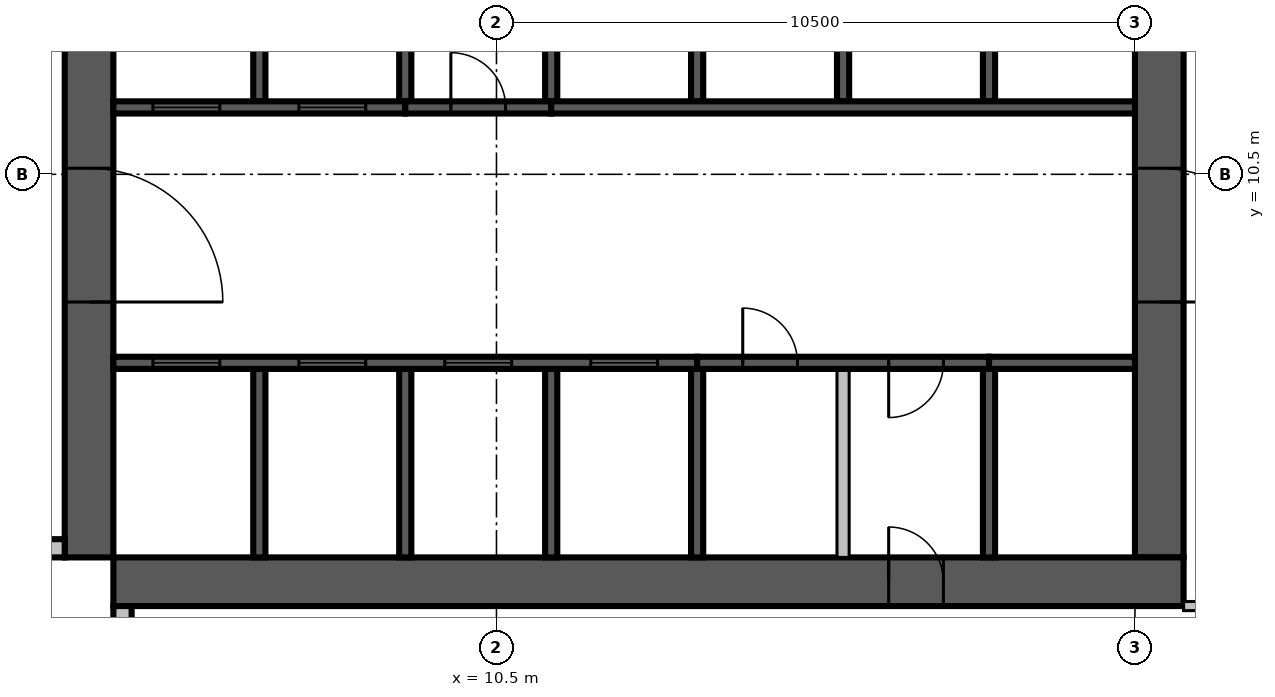
"""IFC4 building model, lengths in metres.
Left out: names, types, materials, properties, quantities, classifications, styles, units other than length and angle.
Written with IfcOpenShell. Run it as: python <this file> out.ifc"""

import sys

from ifc_helpers import new_model, si_unit, direction, frame, frame_2d, origin, place, context, subcontext, project, spatial, rectangle, extrude, source, transform, mapped, element, fill, save


model = new_model("IFC4")
c1 = context("Model", 3, precision=1e-05, world=origin(), true_north=direction((0.0, 1.0)))
c2 = subcontext(c1, "Body", "Model", "MODEL_VIEW")
j1 = project(units=[si_unit("LENGTHUNIT", "METRE"), si_unit("PLANEANGLEUNIT", "RADIAN")], contexts=[c1])
p1 = place(None, origin())
s1 = spatial("IfcSite", under=j1, at=p1, CompositionType="ELEMENT")
p2 = place(p1, origin())
s2 = spatial("IfcBuilding", under=s1, at=p2, CompositionType="ELEMENT")
p3 = place(p2, frame((0.0, 0.0, 242.4)))
s3 = spatial("IfcBuildingStorey", under=s2, at=p3, CompositionType="ELEMENT", Elevation=242.4)
m1 = source(origin(), c2, "Body", "SweptSolid", [
    extrude(rectangle(XDim=17.6, YDim=0.8, at=frame_2d((8.8, 0.0))), origin(), (0.0, 0.0, 1.0), 3.8),
])
p4 = place(p3, frame((3.8, 4.2, 0.0), z_axis=(0.0, 0.0, 1.0), x_axis=(0.0, 1.0, 0.0)))
e1 = element("IfcWall", 1, at=p4, inside=s3, PredefinedType="SHEAR", context=c2, shape_type="MappedRepresentation", body=[
    mapped(m1, transform((0.0, 0.0, 0.0), scale=1.0)),
])
m2 = source(origin(), c2, "Body", "SweptSolid", [
    extrude(rectangle(XDim=2.2, YDim=2.1, at=frame_2d((1.1, 1.05))), frame((0.0, 0.41, 0.0), z_axis=(0.0, -1.0, 0.0), x_axis=(1.0, 0.0, 0.0)), (0.0, 0.0, 1.0), 0.82),
])
p5 = place(p4, frame((4.2, 0.0, 0.0)))
e2 = element("IfcOpeningElement", 2, at=p5, cuts=e1, PredefinedType="OPENING", context=c2, shape_type="MappedRepresentation", body=[
    mapped(m2, transform((0.0, 0.0, 0.0), scale=1.0)),
])
m3 = source(origin(), c2, "Body", "SweptSolid", [
    extrude(rectangle(XDim=0.9, YDim=2.1, at=frame_2d((0.45, 1.05))), frame((0.0, 0.41, 0.0), z_axis=(0.0, -1.0, 0.0), x_axis=(1.0, 0.0, 0.0)), (0.0, 0.0, 1.0), 0.82),
])
p6 = place(p4, frame((10.95, 0.0, 0.0)))
e3 = element("IfcOpeningElement", 3, at=p6, cuts=e1, PredefinedType="OPENING", context=c2, shape_type="MappedRepresentation", body=[
    mapped(m3, transform((0.0, 0.0, 0.0), scale=1.0)),
])
m4 = source(origin(), c2, "Body", "SweptSolid", [
    extrude(rectangle(XDim=16.8, YDim=0.8, at=frame_2d((8.4, 0.0))), origin(), (0.0, 0.0, 1.0), 3.8),
])
p7 = place(p3, frame((21.4, 4.2, 0.0), z_axis=(0.0, 0.0, 1.0), x_axis=(0.0, 1.0, 0.0)))
e4 = element("IfcWall", 4, at=p7, inside=s3, PredefinedType="SHEAR", context=c2, shape_type="MappedRepresentation", body=[
    mapped(m4, transform((0.0, 0.0, 0.0), scale=1.0)),
])
p8 = place(p7, frame((4.2, 0.0, 0.0)))
e5 = element("IfcOpeningElement", 5, at=p8, cuts=e4, PredefinedType="OPENING", context=c2, shape_type="MappedRepresentation", body=[
    mapped(m2, transform((0.0, 0.0, 0.0), scale=1.0)),
])
m5 = source(origin(), c2, "Body", "SweptSolid", [
    extrude(rectangle(XDim=1.2, YDim=2.1, at=frame_2d((0.6, 1.05))), frame((0.0, 0.41, 0.0), z_axis=(0.0, -1.0, 0.0), x_axis=(1.0, 0.0, 0.0)), (0.0, 0.0, 1.0), 0.82),
])
p9 = place(p7, frame((14.7, 0.0, 0.0)))
e6 = element("IfcOpeningElement", 6, at=p9, cuts=e4, PredefinedType="OPENING", context=c2, shape_type="MappedRepresentation", body=[
    mapped(m5, transform((0.0, 0.0, 0.0), scale=1.0)),
])
p10 = place(p3, frame((4.2, 3.8, 0.0), z_axis=(0.0, 0.0, 1.0), x_axis=(1.0, 0.0, 0.0)))
e7 = element("IfcWall", 7, at=p10, inside=s3, PredefinedType="SHEAR", context=c2, shape_type="MappedRepresentation", body=[
    mapped(m1, transform((0.0, 0.0, 0.0), scale=1.0)),
])
p11 = place(p10, frame((12.75, 0.0, 0.0)))
e8 = element("IfcOpeningElement", 8, at=p11, cuts=e7, PredefinedType="OPENING", context=c2, shape_type="MappedRepresentation", body=[
    mapped(m3, transform((0.0, 0.0, 0.0), scale=1.0)),
])
m6 = source(origin(), c2, "Body", "SweptSolid", [
    extrude(rectangle(XDim=3.4, YDim=0.3, at=frame_2d((1.7, 0.0))), origin(), (0.0, 0.0, 1.0), 3.4),
])
p12 = place(p3, frame((0.0, 4.35, 0.0), z_axis=(0.0, 0.0, 1.0), x_axis=(1.0, 0.0, 0.0)))
e9 = element("IfcWall", 9, at=p12, inside=s3, PredefinedType="STANDARD", context=c2, shape_type="MappedRepresentation", body=[
    mapped(m6, transform((0.0, 0.0, 0.0), scale=1.0)),
])
m7 = source(origin(), c2, "Body", "SweptSolid", [
    extrude(rectangle(XDim=1.8, YDim=2.3, at=frame_2d((0.9, 1.15))), frame((0.0, 0.16, 0.0), z_axis=(0.0, -1.0, 0.0), x_axis=(1.0, 0.0, 0.0)), (0.0, 0.0, 1.0), 0.32),
])
p13 = place(p12, frame((1.2, 0.0, 0.6)))
e10 = element("IfcOpeningElement", 10, at=p13, cuts=e9, PredefinedType="OPENING", context=c2, shape_type="MappedRepresentation", body=[
    mapped(m7, transform((0.0, 0.0, 0.0), scale=1.0)),
])
p14 = place(p3, frame((4.35, 3.4, 0.0), z_axis=(0.0, 0.0, 1.0), x_axis=(0.0, -1.0, 0.0)))
e11 = element("IfcWall", 11, at=p14, inside=s3, PredefinedType="STANDARD", context=c2, shape_type="MappedRepresentation", body=[
    mapped(m6, transform((0.0, 0.0, 0.0), scale=1.0)),
])
p15 = place(p14, frame((0.4, 0.0, 0.6)))
e12 = element("IfcOpeningElement", 12, at=p15, cuts=e11, PredefinedType="OPENING", context=c2, shape_type="MappedRepresentation", body=[
    mapped(m7, transform((0.0, 0.0, 0.0), scale=1.0)),
])
m8 = source(origin(), c2, "Body", "SweptSolid", [
    extrude(rectangle(XDim=3.1, YDim=0.2, at=frame_2d((1.55, 0.0))), origin(), (0.0, 0.0, 1.0), 3.8),
])
for number, where, z_axis, x_axis in (
    (13, (6.6, 4.2, 0.0), (0.0, 0.0, 1.0), (0.0, 1.0, 0.0)),
    (14, (9.0, 4.2, 0.0), (0.0, 0.0, 1.0), (0.0, 1.0, 0.0)),
    (15, (11.4, 4.2, 0.0), (0.0, 0.0, 1.0), (0.0, 1.0, 0.0)),
):
    element("IfcWall", number, at=place(p3, frame(where, z_axis=z_axis, x_axis=x_axis)), inside=s3, PredefinedType="SOLIDWALL", context=c2, shape_type="MappedRepresentation", body=[
        mapped(m8, transform((0.0, 0.0, 0.0), scale=1.0)),
    ])
m9 = source(origin(), c2, "Body", "SweptSolid", [
    extrude(rectangle(XDim=3.1, YDim=0.2, at=frame_2d((1.55, 0.0))), origin(), (0.0, 0.0, 1.0), 3.4),
])
for number, where, z_axis, x_axis in (
    (16, (13.8, 4.2, 0.0), (0.0, 0.0, 1.0), (0.0, 1.0, 0.0)),
    (17, (18.6, 4.2, 0.0), (0.0, 0.0, 1.0), (0.0, 1.0, 0.0)),
):
    element("IfcWall", number, at=place(p3, frame(where, z_axis=z_axis, x_axis=x_axis)), inside=s3, PredefinedType="SOLIDWALL", context=c2, shape_type="MappedRepresentation", body=[
        mapped(m9, transform((0.0, 0.0, 0.0), scale=1.0)),
    ])
m10 = source(origin(), c2, "Body", "SweptSolid", [
    extrude(rectangle(XDim=3.1, YDim=0.2, at=frame_2d((1.55, 0.0))), origin(), (0.0, 0.0, 1.0), 3.4),
])
p16 = place(p3, frame((16.2, 4.2, 0.0), z_axis=(0.0, 0.0, 1.0), x_axis=(0.0, 1.0, 0.0)))
e18 = element("IfcWall", 18, at=p16, inside=s3, PredefinedType="PARTITIONING", context=c2, shape_type="MappedRepresentation", body=[
    mapped(m10, transform((0.0, 0.0, 0.0), scale=1.0)),
])
m11 = source(origin(), c2, "Body", "SweptSolid", [
    extrude(rectangle(XDim=3.0, YDim=0.2, at=frame_2d((1.5, 0.0))), origin(), (0.0, 0.0, 1.0), 3.8),
])
p17 = place(p3, frame((6.6, 11.7, 0.0), z_axis=(0.0, 0.0, 1.0), x_axis=(0.0, 1.0, 0.0)))
e19 = element("IfcWall", 19, at=p17, inside=s3, PredefinedType="SOLIDWALL", context=c2, shape_type="MappedRepresentation", body=[
    mapped(m11, transform((0.0, 0.0, 0.0), scale=1.0)),
])
m12 = source(origin(), c2, "Body", "SweptSolid", [
    extrude(rectangle(XDim=3.0, YDim=0.2, at=frame_2d((1.5, 0.0))), origin(), (0.0, 0.0, 1.0), 3.4),
])
for number, where, z_axis, x_axis in (
    (20, (9.0, 11.7, 0.0), (0.0, 0.0, 1.0), (0.0, 1.0, 0.0)),
    (21, (11.4, 11.7, 0.0), (0.0, 0.0, 1.0), (0.0, 1.0, 0.0)),
):
    element("IfcWall", number, at=place(p3, frame(where, z_axis=z_axis, x_axis=x_axis)), inside=s3, PredefinedType="SOLIDWALL", context=c2, shape_type="MappedRepresentation", body=[
        mapped(m12, transform((0.0, 0.0, 0.0), scale=1.0)),
    ])
for number, where, z_axis, x_axis in (
    (22, (13.8, 11.7, 0.0), (0.0, 0.0, 1.0), (0.0, 1.0, 0.0)),
    (23, (16.2, 11.7, 0.0), (0.0, 0.0, 1.0), (0.0, 1.0, 0.0)),
    (24, (18.6, 11.7, 0.0), (0.0, 0.0, 1.0), (0.0, 1.0, 0.0)),
):
    element("IfcWall", number, at=place(p3, frame(where, z_axis=z_axis, x_axis=x_axis)), inside=s3, PredefinedType="SOLIDWALL", context=c2, shape_type="MappedRepresentation", body=[
        mapped(m11, transform((0.0, 0.0, 0.0), scale=1.0)),
    ])
m13 = source(origin(), c2, "Body", "SweptSolid", [
    extrude(rectangle(XDim=9.6, YDim=0.2, at=frame_2d((4.8, 0.0))), origin(), (0.0, 0.0, 1.0), 3.8),
])
p18 = place(p3, frame((4.2, 7.4, 0.0), z_axis=(0.0, 0.0, 1.0), x_axis=(1.0, 0.0, 0.0)))
e25 = element("IfcWall", 25, at=p18, inside=s3, PredefinedType="SOLIDWALL", context=c2, shape_type="MappedRepresentation", body=[
    mapped(m13, transform((0.0, 0.0, 0.0), scale=1.0)),
])
m14 = source(origin(), c2, "Body", "SweptSolid", [
    extrude(rectangle(XDim=1.1, YDim=2.1, at=frame_2d((0.55, 1.05))), frame((0.0, 0.11, 0.0), z_axis=(0.0, -1.0, 0.0), x_axis=(1.0, 0.0, 0.0)), (0.0, 0.0, 1.0), 0.22),
])
p19 = place(p18, frame((0.65, 0.0, 0.0)))
e26 = element("IfcOpeningElement", 26, at=p19, cuts=e25, PredefinedType="OPENING", context=c2, shape_type="MappedRepresentation", body=[
    mapped(m14, transform((0.0, 0.0, 0.0), scale=1.0)),
])
p20 = place(p18, frame((3.05, 0.0, 0.0)))
e27 = element("IfcOpeningElement", 27, at=p20, cuts=e25, PredefinedType="OPENING", context=c2, shape_type="MappedRepresentation", body=[
    mapped(m14, transform((0.0, 0.0, 0.0), scale=1.0)),
])
p21 = place(p18, frame((5.45, 0.0, 0.0)))
e28 = element("IfcOpeningElement", 28, at=p21, cuts=e25, PredefinedType="OPENING", context=c2, shape_type="MappedRepresentation", body=[
    mapped(m14, transform((0.0, 0.0, 0.0), scale=1.0)),
])
p22 = place(p18, frame((7.85, 0.0, 0.0)))
e29 = element("IfcOpeningElement", 29, at=p22, cuts=e25, PredefinedType="OPENING", context=c2, shape_type="MappedRepresentation", body=[
    mapped(m14, transform((0.0, 0.0, 0.0), scale=1.0)),
])
m15 = source(origin(), c2, "Body", "SweptSolid", [
    extrude(rectangle(XDim=4.8, YDim=0.2, at=frame_2d((2.4, 0.0))), origin(), (0.0, 0.0, 1.0), 3.4),
])
p23 = place(p3, frame((13.8, 7.4, 0.0), z_axis=(0.0, 0.0, 1.0), x_axis=(1.0, 0.0, 0.0)))
e30 = element("IfcWall", 30, at=p23, inside=s3, PredefinedType="SOLIDWALL", context=c2, shape_type="MappedRepresentation", body=[
    mapped(m15, transform((0.0, 0.0, 0.0), scale=1.0)),
])
m16 = source(origin(), c2, "Body", "SweptSolid", [
    extrude(rectangle(XDim=0.9, YDim=2.1, at=frame_2d((0.45, 1.05))), frame((0.0, 0.11, 0.0), z_axis=(0.0, -1.0, 0.0), x_axis=(1.0, 0.0, 0.0)), (0.0, 0.0, 1.0), 0.22),
])
p24 = place(p23, frame((0.75, 0.0, 0.0)))
e31 = element("IfcOpeningElement", 31, at=p24, cuts=e30, PredefinedType="OPENING", context=c2, shape_type="MappedRepresentation", body=[
    mapped(m16, transform((0.0, 0.0, 0.0), scale=1.0)),
])
p25 = place(p23, frame((3.15, 0.0, 0.0)))
e32 = element("IfcOpeningElement", 32, at=p25, cuts=e30, PredefinedType="OPENING", context=c2, shape_type="MappedRepresentation", body=[
    mapped(m16, transform((0.0, 0.0, 0.0), scale=1.0)),
])
m17 = source(origin(), c2, "Body", "SweptSolid", [
    extrude(rectangle(XDim=2.4, YDim=0.2, at=frame_2d((1.2, 0.0))), origin(), (0.0, 0.0, 1.0), 3.8),
])
p26 = place(p3, frame((18.6, 7.4, 0.0), z_axis=(0.0, 0.0, 1.0), x_axis=(1.0, 0.0, 0.0)))
e33 = element("IfcWall", 33, at=p26, inside=s3, PredefinedType="SOLIDWALL", context=c2, shape_type="MappedRepresentation", body=[
    mapped(m17, transform((0.0, 0.0, 0.0), scale=1.0)),
])
m18 = source(origin(), c2, "Body", "SweptSolid", [
    extrude(rectangle(XDim=4.8, YDim=0.2, at=frame_2d((2.4, 0.0))), origin(), (0.0, 0.0, 1.0), 3.8),
])
p27 = place(p3, frame((4.2, 11.6, 0.0), z_axis=(0.0, 0.0, 1.0), x_axis=(1.0, 0.0, 0.0)))
e34 = element("IfcWall", 34, at=p27, inside=s3, PredefinedType="SOLIDWALL", context=c2, shape_type="MappedRepresentation", body=[
    mapped(m18, transform((0.0, 0.0, 0.0), scale=1.0)),
])
p28 = place(p27, frame((0.65, 0.0, 0.0)))
e35 = element("IfcOpeningElement", 35, at=p28, cuts=e34, PredefinedType="OPENING", context=c2, shape_type="MappedRepresentation", body=[
    mapped(m14, transform((0.0, 0.0, 0.0), scale=1.0)),
])
p29 = place(p27, frame((3.05, 0.0, 0.0)))
e36 = element("IfcOpeningElement", 36, at=p29, cuts=e34, PredefinedType="OPENING", context=c2, shape_type="MappedRepresentation", body=[
    mapped(m14, transform((0.0, 0.0, 0.0), scale=1.0)),
])
m19 = source(origin(), c2, "Body", "SweptSolid", [
    extrude(rectangle(XDim=2.4, YDim=0.2, at=frame_2d((1.2, 0.0))), origin(), (0.0, 0.0, 1.0), 3.4),
])
p30 = place(p3, frame((9.0, 11.6, 0.0), z_axis=(0.0, 0.0, 1.0), x_axis=(1.0, 0.0, 0.0)))
e37 = element("IfcWall", 37, at=p30, inside=s3, PredefinedType="SOLIDWALL", context=c2, shape_type="MappedRepresentation", body=[
    mapped(m19, transform((0.0, 0.0, 0.0), scale=1.0)),
])
p31 = place(p30, frame((0.75, 0.0, 0.0)))
e38 = element("IfcOpeningElement", 38, at=p31, cuts=e37, PredefinedType="OPENING", context=c2, shape_type="MappedRepresentation", body=[
    mapped(m16, transform((0.0, 0.0, 0.0), scale=1.0)),
])
p32 = place(p3, frame((11.4, 11.6, 0.0), z_axis=(0.0, 0.0, 1.0), x_axis=(1.0, 0.0, 0.0)))
e39 = element("IfcWall", 39, at=p32, inside=s3, PredefinedType="SOLIDWALL", context=c2, shape_type="MappedRepresentation", body=[
    mapped(m13, transform((0.0, 0.0, 0.0), scale=1.0)),
])
m20 = source(origin(), c2, "Body", "SweptSolid", [
    extrude(rectangle(XDim=7.525, YDim=0.15, at=frame_2d((3.763, 0.0))), origin(), (0.0, 0.0, 1.0), 3.4),
])
p33 = place(p3, frame((21.8, 3.4, 0.0), z_axis=(0.0, 0.0, 1.0), x_axis=(1.0, 0.0, 0.0)))
e40 = element("IfcWall", 40, at=p33, inside=s3, PredefinedType="PARTITIONING", context=c2, shape_type="MappedRepresentation", body=[
    mapped(m20, transform((0.0, 0.0, 0.0), scale=1.0)),
])
m21 = source(origin(), c2, "Body", "SweptSolid", [
    extrude(rectangle(XDim=1.0, YDim=2.1, at=frame_2d((0.5, 1.05))), frame((0.0, 0.085, 0.0), z_axis=(0.0, -1.0, 0.0), x_axis=(1.0, 0.0, 0.0)), (0.0, 0.0, 1.0), 0.17),
])
p34 = place(p33, frame((3.6, 0.0, 0.0)))
e41 = element("IfcOpeningElement", 41, at=p34, cuts=e40, PredefinedType="OPENING", context=c2, shape_type="MappedRepresentation", body=[
    mapped(m21, transform((0.0, 0.0, 0.0), scale=1.0)),
])
m22 = source(origin(), c2, "Body", "SweptSolid", [
    extrude(rectangle(XDim=0.9, YDim=2.1, at=frame_2d((0.45, 1.05))), frame((0.0, 0.085, 0.0), z_axis=(0.0, -1.0, 0.0), x_axis=(1.0, 0.0, 0.0)), (0.0, 0.0, 1.0), 0.17),
])
p35 = place(p33, frame((2.312, 0.0, 0.0)))
e42 = element("IfcOpeningElement", 42, at=p35, cuts=e40, PredefinedType="OPENING", context=c2, shape_type="MappedRepresentation", body=[
    mapped(m22, transform((0.0, 0.0, 0.0), scale=1.0)),
])
m23 = source(origin(), c2, "Body", "SweptSolid", [
    extrude(rectangle(XDim=1.1, YDim=2.1, at=frame_2d((0.55, 1.05))), frame((0.0, 0.025, 0.0), z_axis=(0.0, -1.0, 0.0), x_axis=(1.0, 0.0, 0.0)), (0.0, 0.0, 1.0), 0.05),
])
p36 = place(p19, origin())
e43 = element("IfcDoor", 43, at=p36, inside=s3, OperationType="SLIDING_TO_LEFT", PredefinedType="DOOR", context=c2, shape_type="MappedRepresentation", body=[
    mapped(m23, transform((0.0, 0.0, 0.0), scale=1.0)),
])
fill(e26, e43)
p37 = place(p20, origin())
e44 = element("IfcDoor", 44, at=p37, inside=s3, OperationType="SLIDING_TO_LEFT", PredefinedType="DOOR", context=c2, shape_type="MappedRepresentation", body=[
    mapped(m23, transform((0.0, 0.0, 0.0), scale=1.0)),
])
fill(e27, e44)
p38 = place(p21, origin())
e45 = element("IfcDoor", 45, at=p38, inside=s3, OperationType="SLIDING_TO_LEFT", PredefinedType="DOOR", context=c2, shape_type="MappedRepresentation", body=[
    mapped(m23, transform((0.0, 0.0, 0.0), scale=1.0)),
])
fill(e28, e45)
p39 = place(p22, origin())
e46 = element("IfcDoor", 46, at=p39, inside=s3, OperationType="SLIDING_TO_LEFT", PredefinedType="DOOR", context=c2, shape_type="MappedRepresentation", body=[
    mapped(m23, transform((0.0, 0.0, 0.0), scale=1.0)),
])
fill(e29, e46)
m24 = source(origin(), c2, "Body", "SweptSolid", [
    extrude(rectangle(XDim=0.9, YDim=2.1, at=frame_2d((0.45, 1.05))), frame((0.0, 0.025, 0.0), z_axis=(0.0, -1.0, 0.0), x_axis=(1.0, 0.0, 0.0)), (0.0, 0.0, 1.0), 0.05),
])
p40 = place(p24, origin())
e47 = element("IfcDoor", 47, at=p40, inside=s3, OperationType="SINGLE_SWING_LEFT", PredefinedType="DOOR", context=c2, shape_type="MappedRepresentation", body=[
    mapped(m24, transform((0.0, 0.0, 0.0), scale=1.0)),
])
fill(e31, e47)
p41 = place(p25, origin())
e48 = element("IfcDoor", 48, at=p41, inside=s3, OperationType="SINGLE_SWING_RIGHT", PredefinedType="DOOR", context=c2, shape_type="MappedRepresentation", body=[
    mapped(m24, transform((0.0, 0.0, 0.0), scale=1.0)),
])
fill(e32, e48)
p42 = place(p28, origin())
e49 = element("IfcDoor", 49, at=p42, inside=s3, OperationType="SLIDING_TO_LEFT", PredefinedType="DOOR", context=c2, shape_type="MappedRepresentation", body=[
    mapped(m23, transform((0.0, 0.0, 0.0), scale=1.0)),
])
fill(e35, e49)
p43 = place(p29, origin())
e50 = element("IfcDoor", 50, at=p43, inside=s3, OperationType="SLIDING_TO_LEFT", PredefinedType="DOOR", context=c2, shape_type="MappedRepresentation", body=[
    mapped(m23, transform((0.0, 0.0, 0.0), scale=1.0)),
])
fill(e36, e50)
p44 = place(p31, origin())
e51 = element("IfcDoor", 51, at=p44, inside=s3, OperationType="SINGLE_SWING_LEFT", PredefinedType="DOOR", context=c2, shape_type="MappedRepresentation", body=[
    mapped(m24, transform((0.0, 0.0, 0.0), scale=1.0)),
])
fill(e38, e51)
m25 = source(origin(), c2, "Body", "SweptSolid", [
    extrude(rectangle(XDim=2.2, YDim=2.1, at=frame_2d((1.1, 1.05))), frame((0.0, 0.025, 0.0), z_axis=(0.0, -1.0, 0.0), x_axis=(1.0, 0.0, 0.0)), (0.0, 0.0, 1.0), 0.05),
])
p45 = place(p8, origin())
e52 = element("IfcDoor", 52, at=p45, inside=s3, OperationType="DOUBLE_DOOR_SINGLE_SWING", PredefinedType="DOOR", context=c2, shape_type="MappedRepresentation", body=[
    mapped(m25, transform((0.0, 0.0, 0.0), scale=1.0)),
])
fill(e5, e52)
p46 = place(p5, origin())
e53 = element("IfcDoor", 53, at=p46, inside=s3, OperationType="DOUBLE_DOOR_SINGLE_SWING", PredefinedType="DOOR", context=c2, shape_type="MappedRepresentation", body=[
    mapped(m25, transform((0.0, 0.0, 0.0), scale=1.0)),
])
fill(e2, e53)
p47 = place(p11, origin())
e54 = element("IfcDoor", 54, at=p47, inside=s3, OperationType="SINGLE_SWING_LEFT", PredefinedType="DOOR", context=c2, shape_type="MappedRepresentation", body=[
    mapped(m24, transform((0.0, 0.0, 0.0), scale=1.0)),
])
fill(e8, e54)
save(model, sys.argv[1])
